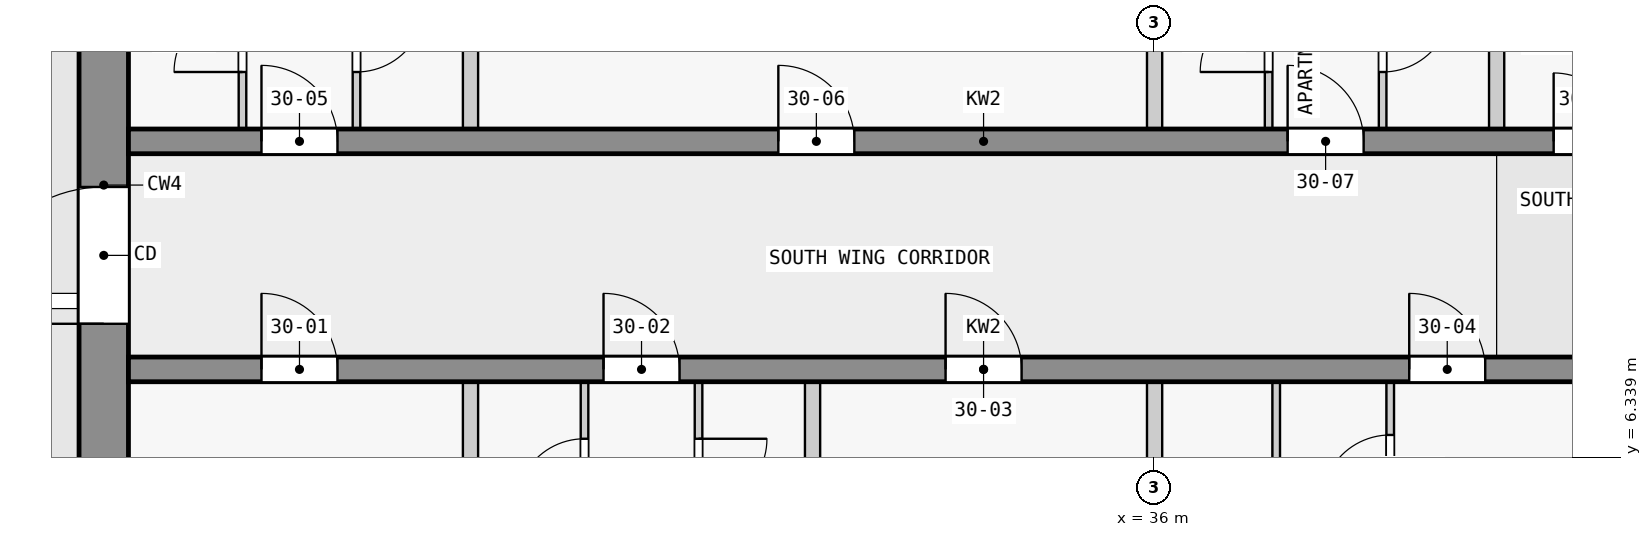
"""IFC4 building model, lengths in metres.
Left out: names, types, materials, properties, quantities, classifications, styles, units other than length and angle.
Written with IfcOpenShell. Run it as: python <this file> out.ifc"""

import sys

from ifc_helpers import new_model, si_unit, direction, frame, frame_2d, origin, place, context, subcontext, project, spatial, rectangle, extrude, element, fill, save


model = new_model("IFC4")
c1 = context("Model", 3, precision=1e-05, world=origin(), true_north=direction((0.0, 1.0)))
c2 = subcontext(c1, "Body", "Model", "MODEL_VIEW")
j1 = project(units=[si_unit("LENGTHUNIT", "METRE"), si_unit("PLANEANGLEUNIT", "RADIAN")], contexts=[c1])
p1 = place(None, origin())
s1 = spatial("IfcSite", under=j1, at=p1, CompositionType="ELEMENT")
p2 = place(p1, origin())
s2 = spatial("IfcBuilding", under=s1, at=p2, CompositionType="ELEMENT")
p3 = place(p2, frame((0.0, 0.0, 116.8)))
s3 = spatial("IfcBuildingStorey", under=s2, at=p3, CompositionType="ELEMENT", Elevation=116.8)
p4 = place(p3, frame((22.175, 2.5, 0.0), z_axis=(0.0, 0.0, 1.0), x_axis=(0.0, 1.0, 0.0)))
e1 = element("IfcWall", 1, at=p4, inside=s3, PredefinedType="SHEAR", context=c2, shape_type="SweptSolid", body=[
    extrude(rectangle(XDim=14.85, YDim=0.65, at=frame_2d((7.425, 0.0))), origin(), (0.0, 0.0, 1.0), 3.25),
])
p5 = place(p4, frame((5.6, 0.0, 0.0)))
e2 = element("IfcOpeningElement", 2, at=p5, cuts=e1, PredefinedType="OPENING", context=c2, shape_type="SweptSolid", body=[
    extrude(rectangle(XDim=1.8, YDim=2.1, at=frame_2d((0.9, 1.05))), frame((0.0, 0.335, 0.0), z_axis=(0.0, -1.0, 0.0), x_axis=(1.0, 0.0, 0.0)), (0.0, 0.0, 1.0), 0.67),
])
p6 = place(p3, frame((22.5, 7.5, 0.0), z_axis=(0.0, 0.0, 1.0), x_axis=(1.0, 0.0, 0.0)))
e3 = element("IfcWall", 3, at=p6, inside=s3, PredefinedType="SHEAR", context=c2, shape_type="SweptSolid", body=[
    extrude(rectangle(XDim=22.5, YDim=0.325, at=frame_2d((11.25, 0.0))), origin(), (0.0, 0.0, 1.0), 3.25),
])
p7 = place(p6, frame((1.75, 0.0, 0.0)))
e4 = element("IfcOpeningElement", 4, at=p7, cuts=e3, PredefinedType="OPENING", context=c2, shape_type="SweptSolid", body=[
    extrude(rectangle(XDim=1.0, YDim=2.1, at=frame_2d((0.5, 1.05))), frame((0.0, 0.172, 0.0), z_axis=(0.0, -1.0, 0.0), x_axis=(1.0, 0.0, 0.0)), (0.0, 0.0, 1.0), 0.345),
])
p8 = place(p6, frame((6.25, 0.0, 0.0)))
e5 = element("IfcOpeningElement", 5, at=p8, cuts=e3, PredefinedType="OPENING", context=c2, shape_type="SweptSolid", body=[
    extrude(rectangle(XDim=1.0, YDim=2.1, at=frame_2d((0.5, 1.05))), frame((0.0, 0.172, 0.0), z_axis=(0.0, -1.0, 0.0), x_axis=(1.0, 0.0, 0.0)), (0.0, 0.0, 1.0), 0.345),
])
p9 = place(p6, frame((10.75, 0.0, 0.0)))
e6 = element("IfcOpeningElement", 6, at=p9, cuts=e3, PredefinedType="OPENING", context=c2, shape_type="SweptSolid", body=[
    extrude(rectangle(XDim=1.0, YDim=2.1, at=frame_2d((0.5, 1.05))), frame((0.0, 0.172, 0.0), z_axis=(0.0, -1.0, 0.0), x_axis=(1.0, 0.0, 0.0)), (0.0, 0.0, 1.0), 0.345),
])
p10 = place(p6, frame((16.85, 0.0, 0.0)))
e7 = element("IfcOpeningElement", 7, at=p10, cuts=e3, PredefinedType="OPENING", context=c2, shape_type="SweptSolid", body=[
    extrude(rectangle(XDim=1.0, YDim=2.1, at=frame_2d((0.5, 1.05))), frame((0.0, 0.172, 0.0), z_axis=(0.0, -1.0, 0.0), x_axis=(1.0, 0.0, 0.0)), (0.0, 0.0, 1.0), 0.345),
])
p11 = place(p3, frame((22.5, 10.5, 0.0), z_axis=(0.0, 0.0, 1.0), x_axis=(1.0, 0.0, 0.0)))
e8 = element("IfcWall", 8, at=p11, inside=s3, PredefinedType="SHEAR", context=c2, shape_type="SweptSolid", body=[
    extrude(rectangle(XDim=22.5, YDim=0.325, at=frame_2d((11.25, 0.0))), origin(), (0.0, 0.0, 1.0), 3.25),
])
p12 = place(p11, frame((1.75, 0.0, 0.0)))
e9 = element("IfcOpeningElement", 9, at=p12, cuts=e8, PredefinedType="OPENING", context=c2, shape_type="SweptSolid", body=[
    extrude(rectangle(XDim=1.0, YDim=2.1, at=frame_2d((0.5, 1.05))), frame((0.0, 0.172, 0.0), z_axis=(0.0, -1.0, 0.0), x_axis=(1.0, 0.0, 0.0)), (0.0, 0.0, 1.0), 0.345),
])
p13 = place(p11, frame((8.55, 0.0, 0.0)))
e10 = element("IfcOpeningElement", 10, at=p13, cuts=e8, PredefinedType="OPENING", context=c2, shape_type="SweptSolid", body=[
    extrude(rectangle(XDim=1.0, YDim=2.1, at=frame_2d((0.5, 1.05))), frame((0.0, 0.172, 0.0), z_axis=(0.0, -1.0, 0.0), x_axis=(1.0, 0.0, 0.0)), (0.0, 0.0, 1.0), 0.345),
])
p14 = place(p11, frame((15.25, 0.0, 0.0)))
e11 = element("IfcOpeningElement", 11, at=p14, cuts=e8, PredefinedType="OPENING", context=c2, shape_type="SweptSolid", body=[
    extrude(rectangle(XDim=1.0, YDim=2.1, at=frame_2d((0.5, 1.05))), frame((0.0, 0.172, 0.0), z_axis=(0.0, -1.0, 0.0), x_axis=(1.0, 0.0, 0.0)), (0.0, 0.0, 1.0), 0.345),
])
p15 = place(p11, frame((18.75, 0.0, 0.0)))
e12 = element("IfcOpeningElement", 12, at=p15, cuts=e8, PredefinedType="OPENING", context=c2, shape_type="SweptSolid", body=[
    extrude(rectangle(XDim=0.9, YDim=2.1, at=frame_2d((0.45, 1.05))), frame((0.0, 0.172, 0.0), z_axis=(0.0, -1.0, 0.0), x_axis=(1.0, 0.0, 0.0)), (0.0, 0.0, 1.0), 0.345),
])
p16 = place(p11, frame((20.95, 0.0, 0.0)))
e13 = element("IfcOpeningElement", 13, at=p16, cuts=e8, PredefinedType="OPENING", context=c2, shape_type="SweptSolid", body=[
    extrude(rectangle(XDim=1.0, YDim=2.1, at=frame_2d((0.5, 1.05))), frame((0.0, 0.172, 0.0), z_axis=(0.0, -1.0, 0.0), x_axis=(1.0, 0.0, 0.0)), (0.0, 0.0, 1.0), 0.345),
])
p17 = place(p3, frame((24.0, 10.663, 0.0), z_axis=(0.0, 0.0, 1.0), x_axis=(0.0, 1.0, 0.0)))
e14 = element("IfcWall", 14, at=p17, inside=s3, PredefinedType="PARTITIONING", context=c2, shape_type="SweptSolid", body=[
    extrude(rectangle(XDim=2.4, YDim=0.1, at=frame_2d((1.2, 0.0))), origin(), (0.0, 0.0, 1.0), 3.25),
])
p18 = place(p17, frame((0.75, 0.0, 0.0)))
e15 = element("IfcOpeningElement", 15, at=p18, cuts=e14, PredefinedType="OPENING", context=c2, shape_type="SweptSolid", body=[
    extrude(rectangle(XDim=0.9, YDim=2.1, at=frame_2d((0.45, 1.05))), frame((0.0, 0.06, 0.0), z_axis=(0.0, -1.0, 0.0), x_axis=(1.0, 0.0, 0.0)), (0.0, 0.0, 1.0), 0.12),
])
p19 = place(p3, frame((25.5, 13.062, 0.0), z_axis=(0.0, 0.0, 1.0), x_axis=(0.0, -1.0, 0.0)))
e16 = element("IfcWall", 16, at=p19, inside=s3, PredefinedType="PARTITIONING", context=c2, shape_type="SweptSolid", body=[
    extrude(rectangle(XDim=2.4, YDim=0.1, at=frame_2d((1.2, 0.0))), origin(), (0.0, 0.0, 1.0), 3.25),
])
p20 = place(p19, frame((0.75, 0.0, 0.0)))
e17 = element("IfcOpeningElement", 17, at=p20, cuts=e16, PredefinedType="OPENING", context=c2, shape_type="SweptSolid", body=[
    extrude(rectangle(XDim=0.9, YDim=2.1, at=frame_2d((0.45, 1.05))), frame((0.0, 0.06, 0.0), z_axis=(0.0, -1.0, 0.0), x_axis=(1.0, 0.0, 0.0)), (0.0, 0.0, 1.0), 0.12),
])
p21 = place(p3, frame((27.0, 1.527, 0.0), z_axis=(0.0, 0.0, 1.0), x_axis=(0.0, 1.0, 0.0)))
e18 = element("IfcWall", 18, at=p21, inside=s3, PredefinedType="PARTITIONING", context=c2, shape_type="SweptSolid", body=[
    extrude(rectangle(XDim=5.811, YDim=0.2, at=frame_2d((2.905, 0.0))), origin(), (0.0, 0.0, 1.0), 3.25),
])
p22 = place(p3, frame((27.0, 10.663, 0.0), z_axis=(0.0, 0.0, 1.0), x_axis=(0.0, 1.0, 0.0)))
e19 = element("IfcWall", 19, at=p22, inside=s3, PredefinedType="PARTITIONING", context=c2, shape_type="SweptSolid", body=[
    extrude(rectangle(XDim=2.3, YDim=0.2, at=frame_2d((1.15, 0.0))), origin(), (0.0, 0.0, 1.0), 3.25),
])
p23 = place(p3, frame((28.5, 4.938, 0.0), z_axis=(0.0, 0.0, 1.0), x_axis=(0.0, 1.0, 0.0)))
e20 = element("IfcWall", 20, at=p23, inside=s3, PredefinedType="PARTITIONING", context=c2, shape_type="SweptSolid", body=[
    extrude(rectangle(XDim=2.4, YDim=0.1, at=frame_2d((1.2, 0.0))), origin(), (0.0, 0.0, 1.0), 3.25),
])
p24 = place(p23, frame((0.75, 0.0, 0.0)))
e21 = element("IfcOpeningElement", 21, at=p24, cuts=e20, PredefinedType="OPENING", context=c2, shape_type="SweptSolid", body=[
    extrude(rectangle(XDim=0.9, YDim=2.1, at=frame_2d((0.45, 1.05))), frame((0.0, 0.06, 0.0), z_axis=(0.0, -1.0, 0.0), x_axis=(1.0, 0.0, 0.0)), (0.0, 0.0, 1.0), 0.12),
])
p25 = place(p3, frame((30.0, 7.337, 0.0), z_axis=(0.0, 0.0, 1.0), x_axis=(0.0, -1.0, 0.0)))
e22 = element("IfcWall", 22, at=p25, inside=s3, PredefinedType="PARTITIONING", context=c2, shape_type="SweptSolid", body=[
    extrude(rectangle(XDim=2.4, YDim=0.1, at=frame_2d((1.2, 0.0))), origin(), (0.0, 0.0, 1.0), 3.25),
])
p26 = place(p25, frame((0.75, 0.0, 0.0)))
e23 = element("IfcOpeningElement", 23, at=p26, cuts=e22, PredefinedType="OPENING", context=c2, shape_type="SweptSolid", body=[
    extrude(rectangle(XDim=0.9, YDim=2.1, at=frame_2d((0.45, 1.05))), frame((0.0, 0.06, 0.0), z_axis=(0.0, -1.0, 0.0), x_axis=(1.0, 0.0, 0.0)), (0.0, 0.0, 1.0), 0.12),
])
p27 = place(p3, frame((31.5, 5.038, 0.0), z_axis=(0.0, 0.0, 1.0), x_axis=(0.0, 1.0, 0.0)))
e24 = element("IfcWall", 24, at=p27, inside=s3, PredefinedType="PARTITIONING", context=c2, shape_type="SweptSolid", body=[
    extrude(rectangle(XDim=2.3, YDim=0.2, at=frame_2d((1.15, 0.0))), origin(), (0.0, 0.0, 1.0), 3.25),
])
for number, where, z_axis, x_axis in (
    (25, (36.0, 1.4, 0.0), (0.0, 0.0, 1.0), (0.0, 1.0, 0.0)),
    (26, (36.0, 10.663, 0.0), (0.0, 0.0, 1.0), (0.0, 1.0, 0.0)),
):
    element("IfcWall", number, at=place(p3, frame(where, z_axis=z_axis, x_axis=x_axis)), inside=s3, PredefinedType="PARTITIONING", context=c2, shape_type="SweptSolid", body=[
        extrude(rectangle(XDim=5.938, YDim=0.2, at=frame_2d((2.969, 0.0))), origin(), (0.0, 0.0, 1.0), 3.25),
    ])
p28 = place(p3, frame((37.5, 10.663, 0.0), z_axis=(0.0, 0.0, 1.0), x_axis=(0.0, 1.0, 0.0)))
e27 = element("IfcWall", 27, at=p28, inside=s3, PredefinedType="PARTITIONING", context=c2, shape_type="SweptSolid", body=[
    extrude(rectangle(XDim=2.4, YDim=0.1, at=frame_2d((1.2, 0.0))), origin(), (0.0, 0.0, 1.0), 3.25),
])
p29 = place(p28, frame((0.75, 0.0, 0.0)))
e28 = element("IfcOpeningElement", 28, at=p29, cuts=e27, PredefinedType="OPENING", context=c2, shape_type="SweptSolid", body=[
    extrude(rectangle(XDim=0.9, YDim=2.1, at=frame_2d((0.45, 1.05))), frame((0.0, 0.06, 0.0), z_axis=(0.0, -1.0, 0.0), x_axis=(1.0, 0.0, 0.0)), (0.0, 0.0, 1.0), 0.12),
])
p30 = place(p3, frame((37.6, 4.988, 0.0), z_axis=(0.0, 0.0, 1.0), x_axis=(0.0, 1.0, 0.0)))
e29 = element("IfcWall", 29, at=p30, inside=s3, PredefinedType="PARTITIONING", context=c2, shape_type="SweptSolid", body=[
    extrude(rectangle(XDim=2.35, YDim=0.1, at=frame_2d((1.175, 0.0))), origin(), (0.0, 0.0, 1.0), 3.25),
])
p31 = place(p3, frame((39.0, 13.062, 0.0), z_axis=(0.0, 0.0, 1.0), x_axis=(0.0, -1.0, 0.0)))
e30 = element("IfcWall", 30, at=p31, inside=s3, PredefinedType="PARTITIONING", context=c2, shape_type="SweptSolid", body=[
    extrude(rectangle(XDim=2.4, YDim=0.1, at=frame_2d((1.2, 0.0))), origin(), (0.0, 0.0, 1.0), 3.25),
])
p32 = place(p31, frame((0.75, 0.0, 0.0)))
e31 = element("IfcOpeningElement", 31, at=p32, cuts=e30, PredefinedType="OPENING", context=c2, shape_type="SweptSolid", body=[
    extrude(rectangle(XDim=0.9, YDim=2.1, at=frame_2d((0.45, 1.05))), frame((0.0, 0.06, 0.0), z_axis=(0.0, -1.0, 0.0), x_axis=(1.0, 0.0, 0.0)), (0.0, 0.0, 1.0), 0.12),
])
p33 = place(p3, frame((39.1, 4.988, 0.0), z_axis=(0.0, 0.0, 1.0), x_axis=(0.0, 1.0, 0.0)))
e32 = element("IfcWall", 32, at=p33, inside=s3, PredefinedType="PARTITIONING", context=c2, shape_type="SweptSolid", body=[
    extrude(rectangle(XDim=2.35, YDim=0.1, at=frame_2d((1.175, 0.0))), origin(), (0.0, 0.0, 1.0), 3.25),
])
p34 = place(p33, frame((0.75, 0.0, 0.0)))
e33 = element("IfcOpeningElement", 33, at=p34, cuts=e32, PredefinedType="OPENING", context=c2, shape_type="SweptSolid", body=[
    extrude(rectangle(XDim=0.9, YDim=2.1, at=frame_2d((0.45, 1.05))), frame((0.0, 0.06, 0.0), z_axis=(0.0, -1.0, 0.0), x_axis=(1.0, 0.0, 0.0)), (0.0, 0.0, 1.0), 0.12),
])
p35 = place(p3, frame((40.5, 10.663, 0.0), z_axis=(0.0, 0.0, 1.0), x_axis=(0.0, 1.0, 0.0)))
e34 = element("IfcWall", 34, at=p35, inside=s3, PredefinedType="PARTITIONING", context=c2, shape_type="SweptSolid", body=[
    extrude(rectangle(XDim=2.3, YDim=0.2, at=frame_2d((1.15, 0.0))), origin(), (0.0, 0.0, 1.0), 3.25),
])
p36 = place(p5, origin())
e35 = element("IfcDoor", 35, at=p36, inside=s3, OperationType="DOUBLE_DOOR_SINGLE_SWING", PredefinedType="DOOR", context=c2, shape_type="SweptSolid", body=[
    extrude(rectangle(XDim=1.8, YDim=2.1, at=frame_2d((0.9, 1.05))), frame((0.0, 0.025, 0.0), z_axis=(0.0, -1.0, 0.0), x_axis=(1.0, 0.0, 0.0)), (0.0, 0.0, 1.0), 0.05),
])
fill(e2, e35)
p37 = place(p7, origin())
e36 = element("IfcDoor", 36, at=p37, inside=s3, OperationType="SINGLE_SWING_LEFT", PredefinedType="DOOR", context=c2, shape_type="SweptSolid", body=[
    extrude(rectangle(XDim=1.0, YDim=2.1, at=frame_2d((0.5, 1.05))), frame((0.0, 0.025, 0.0), z_axis=(0.0, -1.0, 0.0), x_axis=(1.0, 0.0, 0.0)), (0.0, 0.0, 1.0), 0.05),
])
fill(e4, e36)
p38 = place(p8, origin())
e37 = element("IfcDoor", 37, at=p38, inside=s3, OperationType="SINGLE_SWING_LEFT", PredefinedType="DOOR", context=c2, shape_type="SweptSolid", body=[
    extrude(rectangle(XDim=1.0, YDim=2.1, at=frame_2d((0.5, 1.05))), frame((0.0, 0.025, 0.0), z_axis=(0.0, -1.0, 0.0), x_axis=(1.0, 0.0, 0.0)), (0.0, 0.0, 1.0), 0.05),
])
fill(e5, e37)
p39 = place(p9, origin())
e38 = element("IfcDoor", 38, at=p39, inside=s3, OperationType="SINGLE_SWING_LEFT", PredefinedType="DOOR", context=c2, shape_type="SweptSolid", body=[
    extrude(rectangle(XDim=1.0, YDim=2.1, at=frame_2d((0.5, 1.05))), frame((0.0, 0.025, 0.0), z_axis=(0.0, -1.0, 0.0), x_axis=(1.0, 0.0, 0.0)), (0.0, 0.0, 1.0), 0.05),
])
fill(e6, e38)
p40 = place(p10, origin())
e39 = element("IfcDoor", 39, at=p40, inside=s3, OperationType="SINGLE_SWING_RIGHT", PredefinedType="DOOR", context=c2, shape_type="SweptSolid", body=[
    extrude(rectangle(XDim=1.0, YDim=2.1, at=frame_2d((0.5, 1.05))), frame((0.0, 0.025, 0.0), z_axis=(0.0, -1.0, 0.0), x_axis=(1.0, 0.0, 0.0)), (0.0, 0.0, 1.0), 0.05),
])
fill(e7, e39)
p41 = place(p12, origin())
e40 = element("IfcDoor", 40, at=p41, inside=s3, OperationType="SINGLE_SWING_LEFT", PredefinedType="DOOR", context=c2, shape_type="SweptSolid", body=[
    extrude(rectangle(XDim=1.0, YDim=2.1, at=frame_2d((0.5, 1.05))), frame((0.0, 0.025, 0.0), z_axis=(0.0, -1.0, 0.0), x_axis=(1.0, 0.0, 0.0)), (0.0, 0.0, 1.0), 0.05),
])
fill(e9, e40)
p42 = place(p13, origin())
e41 = element("IfcDoor", 41, at=p42, inside=s3, OperationType="SINGLE_SWING_LEFT", PredefinedType="DOOR", context=c2, shape_type="SweptSolid", body=[
    extrude(rectangle(XDim=1.0, YDim=2.1, at=frame_2d((0.5, 1.05))), frame((0.0, 0.025, 0.0), z_axis=(0.0, -1.0, 0.0), x_axis=(1.0, 0.0, 0.0)), (0.0, 0.0, 1.0), 0.05),
])
fill(e10, e41)
p43 = place(p14, origin())
e42 = element("IfcDoor", 42, at=p43, inside=s3, OperationType="SINGLE_SWING_RIGHT", PredefinedType="DOOR", context=c2, shape_type="SweptSolid", body=[
    extrude(rectangle(XDim=1.0, YDim=2.1, at=frame_2d((0.5, 1.05))), frame((0.0, 0.025, 0.0), z_axis=(0.0, -1.0, 0.0), x_axis=(1.0, 0.0, 0.0)), (0.0, 0.0, 1.0), 0.05),
])
fill(e11, e42)
p44 = place(p15, origin())
e43 = element("IfcDoor", 43, at=p44, inside=s3, OperationType="SINGLE_SWING_RIGHT", PredefinedType="DOOR", context=c2, shape_type="SweptSolid", body=[
    extrude(rectangle(XDim=0.9, YDim=2.1, at=frame_2d((0.45, 1.05))), frame((0.0, 0.025, 0.0), z_axis=(0.0, -1.0, 0.0), x_axis=(1.0, 0.0, 0.0)), (0.0, 0.0, 1.0), 0.05),
])
fill(e12, e43)
p45 = place(p24, origin())
e44 = element("IfcDoor", 44, at=p45, inside=s3, OperationType="SINGLE_SWING_LEFT", PredefinedType="DOOR", context=c2, shape_type="SweptSolid", body=[
    extrude(rectangle(XDim=0.9, YDim=2.1, at=frame_2d((0.45, 1.05))), frame((0.0, 0.025, 0.0), z_axis=(0.0, -1.0, 0.0), x_axis=(1.0, 0.0, 0.0)), (0.0, 0.0, 1.0), 0.05),
])
fill(e21, e44)
p46 = place(p26, origin())
e45 = element("IfcDoor", 45, at=p46, inside=s3, OperationType="SINGLE_SWING_LEFT", PredefinedType="DOOR", context=c2, shape_type="SweptSolid", body=[
    extrude(rectangle(XDim=0.9, YDim=2.1, at=frame_2d((0.45, 1.05))), frame((0.0, 0.025, 0.0), z_axis=(0.0, -1.0, 0.0), x_axis=(1.0, 0.0, 0.0)), (0.0, 0.0, 1.0), 0.05),
])
fill(e23, e45)
p47 = place(p34, origin())
e46 = element("IfcDoor", 46, at=p47, inside=s3, OperationType="SINGLE_SWING_RIGHT", PredefinedType="DOOR", context=c2, shape_type="SweptSolid", body=[
    extrude(rectangle(XDim=0.9, YDim=2.1, at=frame_2d((0.45, 1.05))), frame((0.0, 0.025, 0.0), z_axis=(0.0, -1.0, 0.0), x_axis=(1.0, 0.0, 0.0)), (0.0, 0.0, 1.0), 0.05),
])
fill(e33, e46)
p48 = place(p18, origin())
e47 = element("IfcDoor", 47, at=p48, inside=s3, OperationType="SINGLE_SWING_LEFT", PredefinedType="DOOR", context=c2, shape_type="SweptSolid", body=[
    extrude(rectangle(XDim=0.9, YDim=2.1, at=frame_2d((0.45, 1.05))), frame((0.0, 0.025, 0.0), z_axis=(0.0, -1.0, 0.0), x_axis=(1.0, 0.0, 0.0)), (0.0, 0.0, 1.0), 0.05),
])
fill(e15, e47)
p49 = place(p20, origin())
e48 = element("IfcDoor", 48, at=p49, inside=s3, OperationType="SINGLE_SWING_LEFT", PredefinedType="DOOR", context=c2, shape_type="SweptSolid", body=[
    extrude(rectangle(XDim=0.9, YDim=2.1, at=frame_2d((0.45, 1.05))), frame((0.0, 0.025, 0.0), z_axis=(0.0, -1.0, 0.0), x_axis=(1.0, 0.0, 0.0)), (0.0, 0.0, 1.0), 0.05),
])
fill(e17, e48)
p50 = place(p29, origin())
e49 = element("IfcDoor", 49, at=p50, inside=s3, OperationType="SINGLE_SWING_LEFT", PredefinedType="DOOR", context=c2, shape_type="SweptSolid", body=[
    extrude(rectangle(XDim=0.9, YDim=2.1, at=frame_2d((0.45, 1.05))), frame((0.0, 0.025, 0.0), z_axis=(0.0, -1.0, 0.0), x_axis=(1.0, 0.0, 0.0)), (0.0, 0.0, 1.0), 0.05),
])
fill(e28, e49)
p51 = place(p32, origin())
e50 = element("IfcDoor", 50, at=p51, inside=s3, OperationType="SINGLE_SWING_LEFT", PredefinedType="DOOR", context=c2, shape_type="SweptSolid", body=[
    extrude(rectangle(XDim=0.9, YDim=2.1, at=frame_2d((0.45, 1.05))), frame((0.0, 0.025, 0.0), z_axis=(0.0, -1.0, 0.0), x_axis=(1.0, 0.0, 0.0)), (0.0, 0.0, 1.0), 0.05),
])
fill(e31, e50)
save(model, sys.argv[1])
